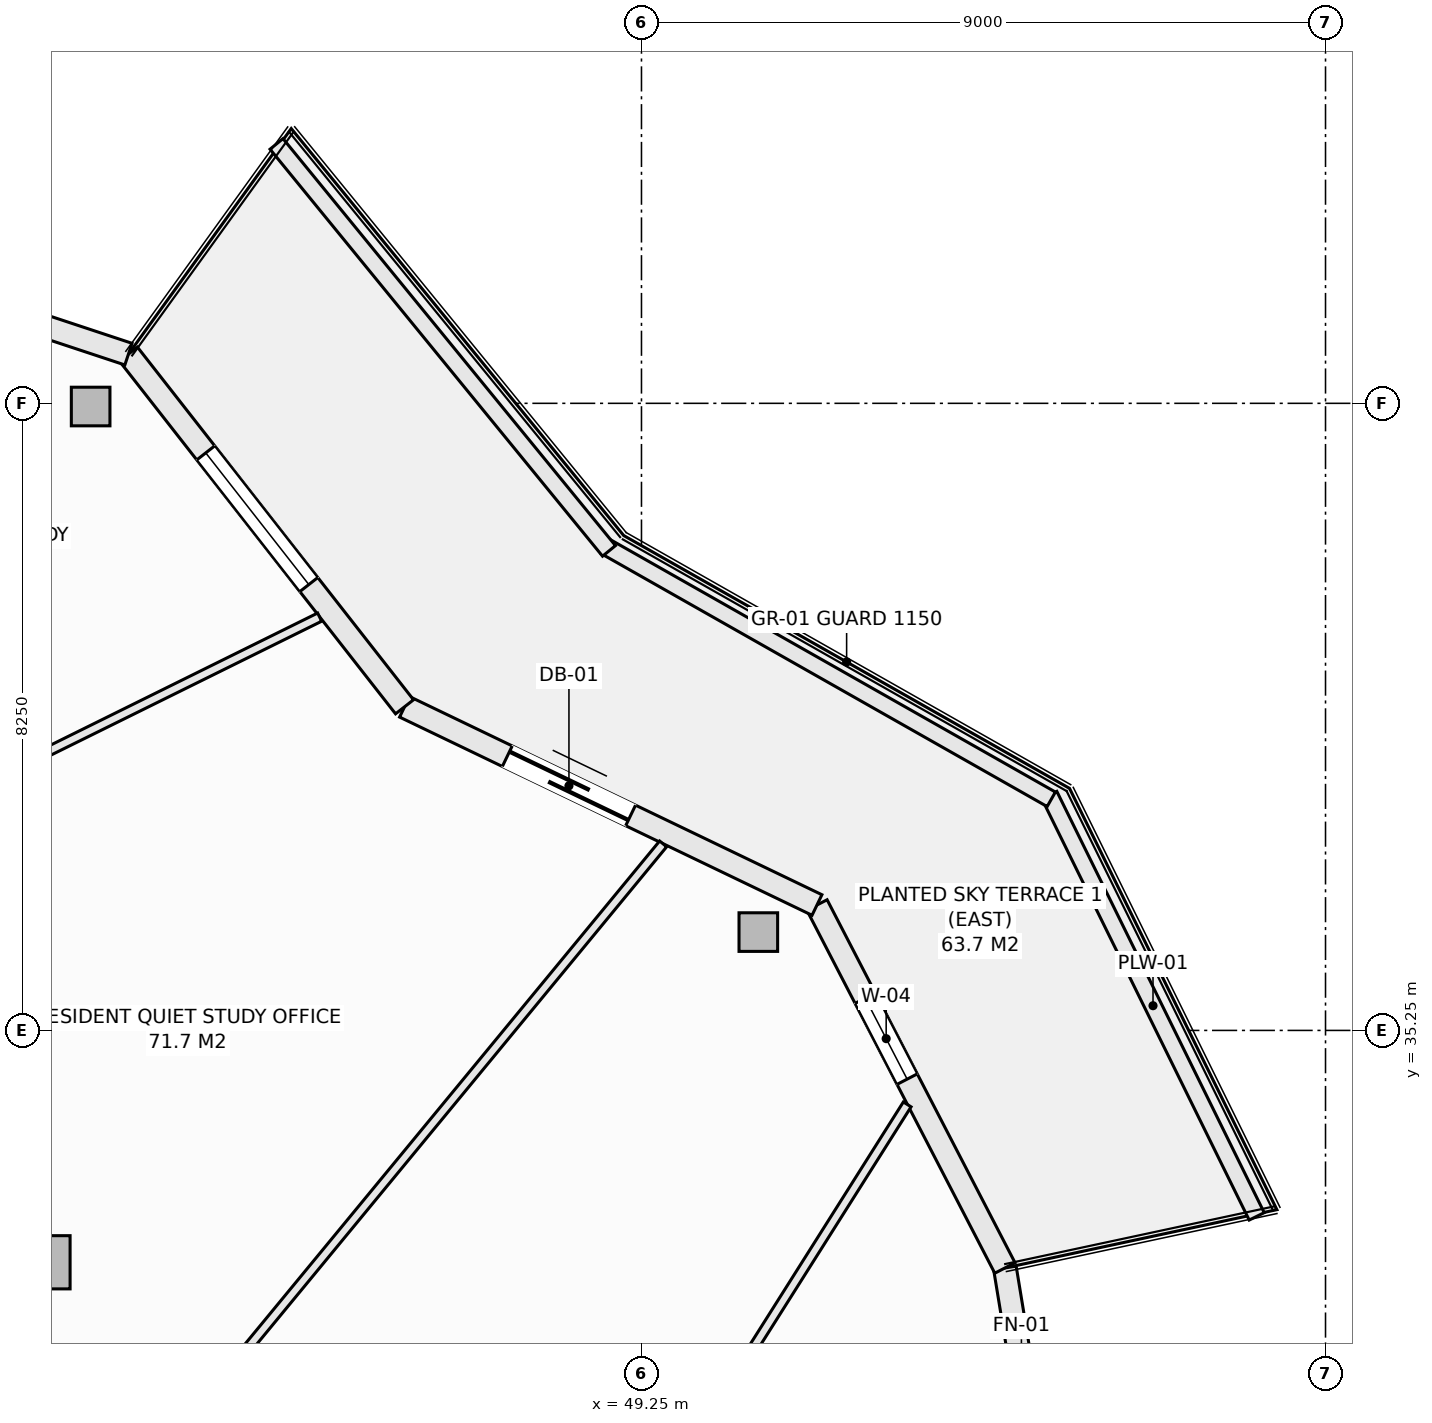
"""IFC4 building model, lengths in metres.
Left out: names, types, materials, properties, quantities, classifications, styles, units other than length and angle.
Written with IfcOpenShell. Run it as: python <this file> out.ifc"""

import sys

from ifc_helpers import new_model, si_unit, direction, frame, frame_2d, origin, origin_2d, place, context, subcontext, project, spatial, rectangle, hollow_rectangle, extrude, element, fill, save


model = new_model("IFC4")
c1 = context("Model", 3, precision=1e-05, world=origin(), true_north=direction((0.0, 1.0)))
c2 = subcontext(c1, "Body", "Model", "MODEL_VIEW")
j1 = project(units=[si_unit("LENGTHUNIT", "METRE"), si_unit("PLANEANGLEUNIT", "RADIAN")], contexts=[c1])
p1 = place(None, origin())
s1 = spatial("IfcSite", under=j1, at=p1, CompositionType="ELEMENT")
p2 = place(p1, origin())
s2 = spatial("IfcBuilding", under=s1, at=p2, CompositionType="ELEMENT")
p3 = place(p2, frame((0.0, 0.0, 206.3)))
s3 = spatial("IfcBuildingStorey", under=s2, at=p3, CompositionType="ELEMENT", Elevation=206.3)
for number, where, z_axis, x_axis in (
    (1, (50.787, 36.544, -0.27), (0.0, 0.0, 1.0), (1.0, 0.0, 0.0)),
    (2, (42.003, 43.458, -0.27), (0.0, 0.0, 1.0), (1.0, 0.0, 0.0)),
):
    element("IfcColumn", number, at=place(p3, frame(where, z_axis=z_axis, x_axis=x_axis)), inside=s3, PredefinedType="COLUMN", context=c2, shape_type="SweptSolid", body=[
        extrude(hollow_rectangle(XDim=0.508, YDim=0.508, WallThickness=0.019, at=origin_2d()), origin(), (0.0, 0.0, 1.0), 3.3),
    ])
p4 = place(p3, frame((41.382, 32.199, -0.27), z_axis=(0.0, 0.0, 1.0), x_axis=(1.0, 0.0, 0.0)))
e3 = element("IfcColumn", 3, at=p4, inside=s3, PredefinedType="COLUMN", context=c2, shape_type="SweptSolid", body=[
    extrude(rectangle(XDim=0.7, YDim=0.7, at=origin_2d()), origin(), (0.0, 0.0, 1.0), 3.3),
])
p5 = place(p3, frame((54.032, 32.125, 0.0), z_axis=(0.0, 0.0, 1.0), x_axis=(0.16237087798, -0.986729799886, 0.0)))
e4 = element("IfcWall", 4, at=p5, inside=s3, PredefinedType="SOLIDWALL", context=c2, shape_type="SweptSolid", body=[
    extrude(rectangle(XDim=5.193, YDim=0.3, at=frame_2d((2.597, 0.0))), origin(), (0.0, 0.0, 1.0), 2.605),
])
p6 = place(p5, frame((1.497, 0.0, 0.72)))
e5 = element("IfcOpeningElement", 5, at=p6, cuts=e4, PredefinedType="OPENING", context=c2, shape_type="SweptSolid", body=[
    extrude(rectangle(XDim=2.2, YDim=1.65, at=frame_2d((1.1, 0.825))), frame((0.0, 0.16, 0.0), z_axis=(0.0, -1.0, 0.0), x_axis=(1.0, 0.0, 0.0)), (0.0, 0.0, 1.0), 0.32),
])
p7 = place(p3, frame((51.559, 36.9, 0.0), z_axis=(0.0, 0.0, 1.0), x_axis=(0.459808219482, -0.888018243786, 0.0)))
e6 = element("IfcWall", 6, at=p7, inside=s3, PredefinedType="SOLIDWALL", context=c2, shape_type="SweptSolid", body=[
    extrude(rectangle(XDim=5.378, YDim=0.3, at=frame_2d((2.689, 0.0))), origin(), (0.0, 0.0, 1.0), 2.605),
])
p8 = place(p7, frame((1.38, 0.0, 0.72)))
e7 = element("IfcOpeningElement", 7, at=p8, cuts=e6, PredefinedType="OPENING", context=c2, shape_type="SweptSolid", body=[
    extrude(rectangle(XDim=1.2, YDim=1.65, at=frame_2d((0.6, 0.825))), frame((0.0, 0.16, 0.0), z_axis=(0.0, -1.0, 0.0), x_axis=(1.0, 0.0, 0.0)), (0.0, 0.0, 1.0), 0.32),
])
p9 = place(p3, frame((46.133, 39.507, 0.0), z_axis=(0.0, 0.0, 1.0), x_axis=(0.901348331142, -0.433094892545, 0.0)))
e8 = element("IfcWall", 8, at=p9, inside=s3, PredefinedType="SOLIDWALL", context=c2, shape_type="SweptSolid", body=[
    extrude(rectangle(XDim=6.021, YDim=0.3, at=frame_2d((3.01, 0.0))), origin(), (0.0, 0.0, 1.0), 2.605),
])
p10 = place(p9, frame((1.5, 0.0, 0.0)))
e9 = element("IfcOpeningElement", 9, at=p10, cuts=e8, PredefinedType="OPENING", context=c2, shape_type="SweptSolid", body=[
    extrude(rectangle(XDim=1.8, YDim=2.25, at=frame_2d((0.9, 1.125))), frame((0.0, 0.16, 0.0), z_axis=(0.0, -1.0, 0.0), x_axis=(1.0, 0.0, 0.0)), (0.0, 0.0, 1.0), 0.32),
])
p11 = place(p3, frame((42.5, 44.147, 0.0), z_axis=(0.0, 0.0, 1.0), x_axis=(0.616450126935, -0.787393955401, 0.0)))
e10 = element("IfcWall", 10, at=p11, inside=s3, PredefinedType="SOLIDWALL", context=c2, shape_type="SweptSolid", body=[
    extrude(rectangle(XDim=5.893, YDim=0.3, at=frame_2d((2.946, 0.0))), origin(), (0.0, 0.0, 1.0), 2.605),
])
p12 = place(p11, frame((1.65, 0.0, 0.72)))
e11 = element("IfcOpeningElement", 11, at=p12, cuts=e10, PredefinedType="OPENING", context=c2, shape_type="SweptSolid", body=[
    extrude(rectangle(XDim=2.2, YDim=1.65, at=frame_2d((1.1, 0.825))), frame((0.0, 0.16, 0.0), z_axis=(0.0, -1.0, 0.0), x_axis=(1.0, 0.0, 0.0)), (0.0, 0.0, 1.0), 0.32),
])
p13 = place(p3, frame((36.531, 46.125, 0.0), z_axis=(0.0, 0.0, 1.0), x_axis=(0.949240877604, -0.314550085495, 0.0)))
e12 = element("IfcWall", 12, at=p13, inside=s3, PredefinedType="SOLIDWALL", context=c2, shape_type="SweptSolid", body=[
    extrude(rectangle(XDim=6.288, YDim=0.3, at=frame_2d((3.144, 0.0))), origin(), (0.0, 0.0, 1.0), 2.605),
])
p14 = place(p13, frame((2.044, 0.0, 0.72)))
e13 = element("IfcOpeningElement", 13, at=p14, cuts=e12, PredefinedType="OPENING", context=c2, shape_type="SweptSolid", body=[
    extrude(rectangle(XDim=2.2, YDim=1.65, at=frame_2d((1.1, 0.825))), frame((0.0, 0.16, 0.0), z_axis=(0.0, -1.0, 0.0), x_axis=(1.0, 0.0, 0.0)), (0.0, 0.0, 1.0), 0.32),
])
p15 = place(p3, frame((54.616, 38.347, 0.0), z_axis=(0.0, 0.0, 1.0), x_axis=(0.441640961804, -0.897191875162, 0.0)))
e14 = element("IfcWall", 14, at=p15, inside=s3, PredefinedType="PARAPET", context=c2, shape_type="SweptSolid", body=[
    extrude(rectangle(XDim=6.178, YDim=0.22, at=frame_2d((3.089, 0.0))), origin(), (0.0, 0.0, 1.0), 0.52),
])
p16 = place(p3, frame((48.776, 41.617, 0.0), z_axis=(0.0, 0.0, 1.0), x_axis=(0.869860619267, -0.493297580623, 0.0)))
e15 = element("IfcWall", 15, at=p16, inside=s3, PredefinedType="PARAPET", context=c2, shape_type="SweptSolid", body=[
    extrude(rectangle(XDim=6.743, YDim=0.22, at=frame_2d((3.371, 0.0))), origin(), (0.0, 0.0, 1.0), 0.52),
])
p17 = place(p3, frame((44.448, 46.913, 0.0), z_axis=(0.0, 0.0, 1.0), x_axis=(0.632697312147, -0.774399193699, 0.0)))
e16 = element("IfcWall", 16, at=p17, inside=s3, PredefinedType="PARAPET", context=c2, shape_type="SweptSolid", body=[
    extrude(rectangle(XDim=6.914, YDim=0.22, at=frame_2d((3.457, 0.0))), origin(), (0.0, 0.0, 1.0), 0.52),
])
p18 = place(p3, frame((41.582, 16.617, 0.0), z_axis=(0.0, 0.0, 1.0), x_axis=(0.534374121444, 0.845248069108, 0.0)))
e17 = element("IfcWall", 17, at=p18, inside=s3, PredefinedType="PARTITIONING", context=c2, shape_type="SweptSolid", body=[
    extrude(rectangle(XDim=20.892, YDim=0.12, at=frame_2d((10.446, 0.0))), origin(), (0.0, 0.0, 1.0), 3.03),
])
p19 = place(p3, frame((44.01, 31.0, 0.0), z_axis=(0.0, 0.0, 1.0), x_axis=(0.635986973411, 0.771699792439, 0.0)))
e18 = element("IfcWall", 18, at=p19, inside=s3, PredefinedType="PARTITIONING", context=c2, shape_type="SweptSolid", body=[
    extrude(rectangle(XDim=8.687, YDim=0.12, at=frame_2d((4.344, 0.0))), origin(), (0.0, 0.0, 1.0), 2.712),
])
p20 = place(p3, frame((35.157, 35.812, 0.0), z_axis=(0.0, 0.0, 1.0), x_axis=(0.896376577458, 0.443293391992, 0.0)))
e19 = element("IfcWall", 19, at=p20, inside=s3, PredefinedType="PARTITIONING", context=c2, shape_type="SweptSolid", body=[
    extrude(rectangle(XDim=10.998, YDim=0.12, at=frame_2d((5.499, 0.0))), origin(), (0.0, 0.0, 1.0), 2.478),
])
p21 = place(p8, origin())
e20 = element("IfcWindow", 20, at=p21, inside=s3, PartitioningType="SINGLE_PANEL", PredefinedType="WINDOW", context=c2, shape_type="SweptSolid", body=[
    extrude(rectangle(XDim=1.2, YDim=1.65, at=frame_2d((0.6, 0.825))), frame((0.0, 0.03, 0.0), z_axis=(0.0, -1.0, 0.0), x_axis=(1.0, 0.0, 0.0)), (0.0, 0.0, 1.0), 0.06),
])
fill(e7, e20)
p22 = place(p10, origin())
e21 = element("IfcDoor", 21, at=p22, inside=s3, OperationType="SLIDING_TO_LEFT", PredefinedType="DOOR", context=c2, shape_type="SweptSolid", body=[
    extrude(rectangle(XDim=1.8, YDim=2.25, at=frame_2d((0.9, 1.125))), frame((0.0, 0.025, 0.0), z_axis=(0.0, -1.0, 0.0), x_axis=(1.0, 0.0, 0.0)), (0.0, 0.0, 1.0), 0.05),
])
fill(e9, e21)
p23 = place(p12, origin())
e22 = element("IfcWindow", 22, at=p23, inside=s3, PartitioningType="SINGLE_PANEL", PredefinedType="WINDOW", context=c2, shape_type="SweptSolid", body=[
    extrude(rectangle(XDim=2.2, YDim=1.65, at=frame_2d((1.1, 0.825))), frame((0.0, 0.03, 0.0), z_axis=(0.0, -1.0, 0.0), x_axis=(1.0, 0.0, 0.0)), (0.0, 0.0, 1.0), 0.06),
])
fill(e11, e22)
save(model, sys.argv[1])
